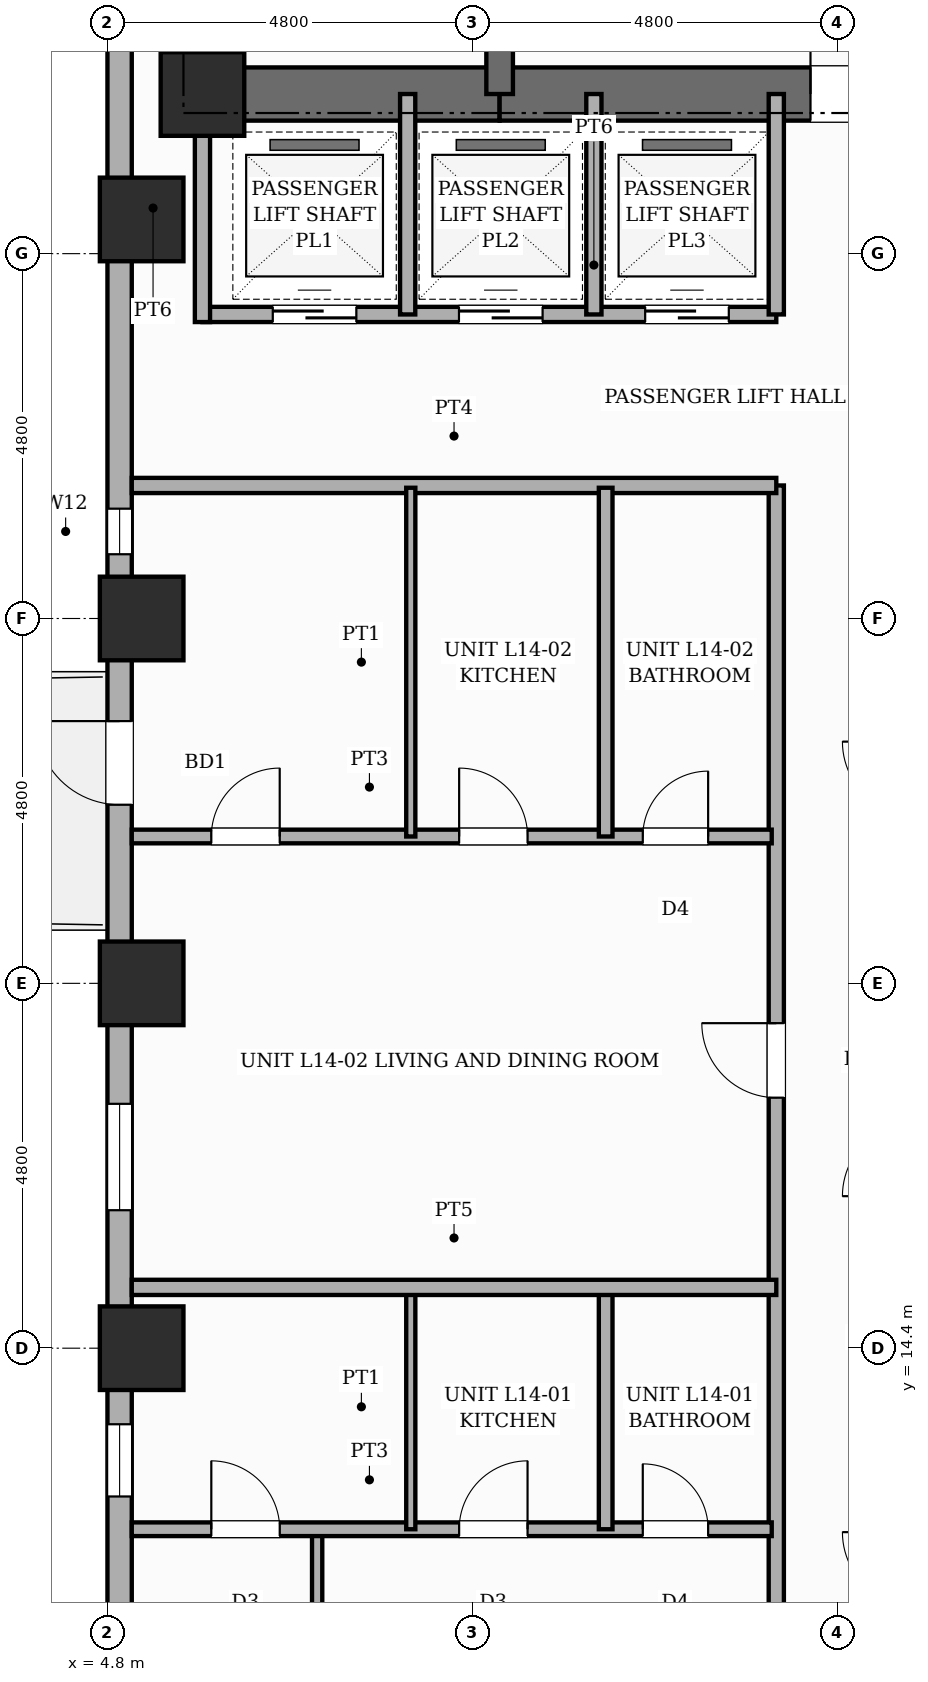
"""IFC4 building model, lengths in metres.
Left out: names, types, materials, properties, quantities, classifications, styles, units other than length and angle.
Written with IfcOpenShell. Run it as: python <this file> out.ifc"""

import sys

from ifc_helpers import new_model, si_unit, direction, frame, frame_2d, origin, origin_2d, place, context, subcontext, project, spatial, rectangle, extrude, element, fill, save


model = new_model("IFC4")
c1 = context("Model", 3, precision=1e-05, world=origin(), true_north=direction((0.0, 1.0)))
c2 = subcontext(c1, "Body", "Model", "MODEL_VIEW")
j1 = project(units=[si_unit("LENGTHUNIT", "METRE"), si_unit("PLANEANGLEUNIT", "RADIAN")], contexts=[c1])
p1 = place(None, origin())
s1 = spatial("IfcSite", under=j1, at=p1, CompositionType="ELEMENT")
p2 = place(p1, origin())
s2 = spatial("IfcBuilding", under=s1, at=p2, CompositionType="ELEMENT")
p3 = place(p2, frame((0.0, 0.0, 57.4)))
s3 = spatial("IfcBuildingStorey", under=s2, at=p3, CompositionType="ELEMENT", Elevation=57.4)
p4 = place(p3, frame((6.05, 30.55, 0.0), z_axis=(0.0, 0.0, 1.0), x_axis=(0.0, 1.0, 0.0)))
e1 = element("IfcWall", 1, at=p4, inside=s3, PredefinedType="SHEAR", context=c2, shape_type="SweptSolid", body=[
    extrude(rectangle(XDim=15.6, YDim=0.7, at=frame_2d((7.8, 0.0))), origin(), (0.0, 0.0, 1.0), 3.6),
])
p5 = place(p3, frame((6.05, 30.9, 0.0), z_axis=(0.0, 0.0, 1.0), x_axis=(1.0, 0.0, 0.0)))
e2 = element("IfcWall", 2, at=p5, inside=s3, PredefinedType="SHEAR", context=c2, shape_type="SweptSolid", body=[
    extrude(rectangle(XDim=3.91, YDim=0.7, at=frame_2d((1.955, 0.0))), origin(), (0.0, 0.0, 1.0), 3.6),
])
p6 = place(p3, frame((9.96, 30.9, 0.0), z_axis=(0.0, 0.0, 1.0), x_axis=(1.0, 0.0, 0.0)))
e3 = element("IfcWall", 3, at=p6, inside=s3, PredefinedType="SHEAR", context=c2, shape_type="SweptSolid", body=[
    extrude(rectangle(XDim=8.88, YDim=0.7, at=frame_2d((4.44, 0.0))), origin(), (0.0, 0.0, 1.0), 3.6),
])
p7 = place(p6, frame((4.09, 0.0, 0.0)))
e4 = element("IfcOpeningElement", 4, at=p7, cuts=e3, PredefinedType="OPENING", context=c2, shape_type="SweptSolid", body=[
    extrude(rectangle(XDim=1.0, YDim=2.15, at=frame_2d((0.5, 1.075))), frame((0.0, 0.36, 0.0), z_axis=(0.0, -1.0, 0.0), x_axis=(1.0, 0.0, 0.0)), (0.0, 0.0, 1.0), 0.72),
])
p8 = place(p3, frame((9.96, 30.9, 0.0), z_axis=(0.0, 0.0, 1.0), x_axis=(0.0, 1.0, 0.0)))
e5 = element("IfcWall", 5, at=p8, inside=s3, PredefinedType="SHEAR", context=c2, shape_type="SweptSolid", body=[
    extrude(rectangle(XDim=14.9, YDim=0.35, at=frame_2d((7.45, 0.0))), origin(), (0.0, 0.0, 1.0), 3.6),
])
p9 = place(p8, frame((0.65, 0.0, 0.0)))
e6 = element("IfcOpeningElement", 6, at=p9, cuts=e5, PredefinedType="OPENING", context=c2, shape_type="SweptSolid", body=[
    extrude(rectangle(XDim=0.95, YDim=2.1, at=frame_2d((0.475, 1.05))), frame((0.0, 0.185, 0.0), z_axis=(0.0, -1.0, 0.0), x_axis=(1.0, 0.0, 0.0)), (0.0, 0.0, 1.0), 0.37),
])
p10 = place(p8, frame((10.45, 0.0, 0.0)))
e7 = element("IfcOpeningElement", 7, at=p10, cuts=e5, PredefinedType="OPENING", context=c2, shape_type="SweptSolid", body=[
    extrude(rectangle(XDim=1.0, YDim=2.15, at=frame_2d((0.5, 1.075))), frame((0.0, 0.185, 0.0), z_axis=(0.0, -1.0, 0.0), x_axis=(1.0, 0.0, 0.0)), (0.0, 0.0, 1.0), 0.37),
])
for number, where, z_axis, x_axis in (
    (8, (5.25, 14.4, 0.0), (0.0, 0.0, 1.0), (1.0, 0.0, 0.0)),
    (9, (5.25, 19.2, 0.0), (0.0, 0.0, 1.0), (1.0, 0.0, 0.0)),
    (10, (5.25, 24.0, 0.0), (0.0, 0.0, 1.0), (1.0, 0.0, 0.0)),
    (11, (5.25, 29.25, 0.0), (0.0, 0.0, 1.0), (1.0, 0.0, 0.0)),
    (12, (6.05, 30.9, 0.0), (0.0, 0.0, 1.0), (1.0, 0.0, 0.0)),
):
    element("IfcColumn", number, at=place(p3, frame(where, z_axis=z_axis, x_axis=x_axis)), inside=s3, PredefinedType="COLUMN", context=c2, shape_type="SweptSolid", body=[
        extrude(rectangle(XDim=1.1, YDim=1.1, at=origin_2d()), origin(), (0.0, 0.0, 1.0), 3.6),
    ])
p11 = place(p3, frame((4.96, 7.2, 0.0), z_axis=(0.0, 0.0, 1.0), x_axis=(0.0, 1.0, 0.0)))
e13 = element("IfcWall", 13, at=p11, inside=s3, PredefinedType="STANDARD", context=c2, shape_type="SweptSolid", body=[
    extrude(rectangle(XDim=38.4, YDim=0.32, at=frame_2d((19.2, 0.0))), origin(), (0.0, 0.0, 1.0), 2.53),
])
p12 = place(p11, frame((14.35, 0.0, 0.0)))
e14 = element("IfcOpeningElement", 14, at=p12, cuts=e13, PredefinedType="OPENING", context=c2, shape_type="SweptSolid", body=[
    extrude(rectangle(XDim=1.1, YDim=2.15, at=frame_2d((0.55, 1.075))), frame((0.0, 0.17, 0.0), z_axis=(0.0, -1.0, 0.0), x_axis=(1.0, 0.0, 0.0)), (0.0, 0.0, 1.0), 0.34),
])
p13 = place(p11, frame((5.249, 0.0, 0.45)))
e15 = element("IfcOpeningElement", 15, at=p13, cuts=e13, PredefinedType="OPENING", context=c2, shape_type="SweptSolid", body=[
    extrude(rectangle(XDim=0.95, YDim=1.8, at=frame_2d((0.475, 0.9))), frame((0.0, 0.17, 0.0), z_axis=(0.0, -1.0, 0.0), x_axis=(1.0, 0.0, 0.0)), (0.0, 0.0, 1.0), 0.34),
])
p14 = place(p11, frame((17.645, 0.0, 0.45)))
e16 = element("IfcOpeningElement", 16, at=p14, cuts=e13, PredefinedType="OPENING", context=c2, shape_type="SweptSolid", body=[
    extrude(rectangle(XDim=0.6, YDim=1.8, at=frame_2d((0.3, 0.9))), frame((0.0, 0.17, 0.0), z_axis=(0.0, -1.0, 0.0), x_axis=(1.0, 0.0, 0.0)), (0.0, 0.0, 1.0), 0.34),
])
p15 = place(p11, frame((0.47, 0.0, 0.45)))
e17 = element("IfcOpeningElement", 17, at=p15, cuts=e13, PredefinedType="OPENING", context=c2, shape_type="SweptSolid", body=[
    extrude(rectangle(XDim=0.95, YDim=1.8, at=frame_2d((0.475, 0.9))), frame((0.0, 0.17, 0.0), z_axis=(0.0, -1.0, 0.0), x_axis=(1.0, 0.0, 0.0)), (0.0, 0.0, 1.0), 0.34),
])
p16 = place(p11, frame((9.015, 0.0, 0.65)))
e18 = element("IfcOpeningElement", 18, at=p16, cuts=e13, PredefinedType="OPENING", context=c2, shape_type="SweptSolid", body=[
    extrude(rectangle(XDim=1.4, YDim=1.1, at=frame_2d((0.7, 0.55))), frame((0.0, 0.17, 0.0), z_axis=(0.0, -1.0, 0.0), x_axis=(1.0, 0.0, 0.0)), (0.0, 0.0, 1.0), 0.34),
])
p17 = place(p3, frame((6.05, 28.0, 0.0), z_axis=(0.0, 0.0, 1.0), x_axis=(1.0, 0.0, 0.0)))
e19 = element("IfcWall", 19, at=p17, inside=s3, PredefinedType="POLYGONAL", context=c2, shape_type="SweptSolid", body=[
    extrude(rectangle(XDim=7.55, YDim=0.2, at=frame_2d((3.775, 0.0))), origin(), (0.0, 0.0, 1.0), 3.35),
])
p18 = place(p17, frame((0.925, 0.0, 0.0)))
e20 = element("IfcOpeningElement", 20, at=p18, cuts=e19, PredefinedType="OPENING", context=c2, shape_type="SweptSolid", body=[
    extrude(rectangle(XDim=1.1, YDim=2.15, at=frame_2d((0.55, 1.075))), frame((0.0, 0.11, 0.0), z_axis=(0.0, -1.0, 0.0), x_axis=(1.0, 0.0, 0.0)), (0.0, 0.0, 1.0), 0.22),
])
p19 = place(p17, frame((3.375, 0.0, 0.0)))
e21 = element("IfcOpeningElement", 21, at=p19, cuts=e19, PredefinedType="OPENING", context=c2, shape_type="SweptSolid", body=[
    extrude(rectangle(XDim=1.1, YDim=2.15, at=frame_2d((0.55, 1.075))), frame((0.0, 0.11, 0.0), z_axis=(0.0, -1.0, 0.0), x_axis=(1.0, 0.0, 0.0)), (0.0, 0.0, 1.0), 0.22),
])
p20 = place(p17, frame((5.825, 0.0, 0.0)))
e22 = element("IfcOpeningElement", 22, at=p20, cuts=e19, PredefinedType="OPENING", context=c2, shape_type="SweptSolid", body=[
    extrude(rectangle(XDim=1.1, YDim=2.15, at=frame_2d((0.55, 1.075))), frame((0.0, 0.11, 0.0), z_axis=(0.0, -1.0, 0.0), x_axis=(1.0, 0.0, 0.0)), (0.0, 0.0, 1.0), 0.22),
])
p21 = place(p3, frame((6.05, 27.9, 0.0), z_axis=(0.0, 0.0, 1.0), x_axis=(0.0, 1.0, 0.0)))
e23 = element("IfcWall", 23, at=p21, inside=s3, PredefinedType="POLYGONAL", context=c2, shape_type="SweptSolid", body=[
    extrude(rectangle(XDim=3.0, YDim=0.2, at=frame_2d((1.5, 0.0))), origin(), (0.0, 0.0, 1.0), 3.35),
])
for number, where, z_axis, x_axis in (
    (24, (13.6, 28.0, 0.0), (0.0, 0.0, 1.0), (0.0, 1.0, 0.0)),
    (25, (8.75, 28.0, 0.0), (0.0, 0.0, 1.0), (0.0, 1.0, 0.0)),
    (26, (11.2, 28.0, 0.0), (0.0, 0.0, 1.0), (0.0, 1.0, 0.0)),
):
    element("IfcWall", number, at=place(p3, frame(where, z_axis=z_axis, x_axis=x_axis)), inside=s3, PredefinedType="POLYGONAL", context=c2, shape_type="SweptSolid", body=[
        extrude(rectangle(XDim=2.9, YDim=0.2, at=frame_2d((1.45, 0.0))), origin(), (0.0, 0.0, 1.0), 3.35),
    ])
p22 = place(p3, frame((13.6, 5.12, 0.0), z_axis=(0.0, 0.0, 1.0), x_axis=(0.0, 1.0, 0.0)))
e27 = element("IfcWall", 27, at=p22, inside=s3, PredefinedType="PARTITIONING", context=c2, shape_type="SweptSolid", body=[
    extrude(rectangle(XDim=20.63, YDim=0.2, at=frame_2d((10.315, 0.0))), origin(), (0.0, 0.0, 1.0), 3.35),
])
p23 = place(p22, frame((2.939, 0.0, 0.0)))
e28 = element("IfcOpeningElement", 28, at=p23, cuts=e27, PredefinedType="OPENING", context=c2, shape_type="SweptSolid", body=[
    extrude(rectangle(XDim=0.98, YDim=2.18, at=frame_2d((0.49, 1.09))), frame((0.0, 0.11, 0.0), z_axis=(0.0, -1.0, 0.0), x_axis=(1.0, 0.0, 0.0)), (0.0, 0.0, 1.0), 0.22),
])
p24 = place(p22, frame((12.576, 0.0, 0.0)))
e29 = element("IfcOpeningElement", 29, at=p24, cuts=e27, PredefinedType="OPENING", context=c2, shape_type="SweptSolid", body=[
    extrude(rectangle(XDim=0.98, YDim=2.18, at=frame_2d((0.49, 1.09))), frame((0.0, 0.11, 0.0), z_axis=(0.0, -1.0, 0.0), x_axis=(1.0, 0.0, 0.0)), (0.0, 0.0, 1.0), 0.22),
])
p25 = place(p3, frame((5.12, 25.75, 0.0), z_axis=(0.0, 0.0, 1.0), x_axis=(1.0, 0.0, 0.0)))
e30 = element("IfcWall", 30, at=p25, inside=s3, PredefinedType="PARTITIONING", context=c2, shape_type="SweptSolid", body=[
    extrude(rectangle(XDim=8.48, YDim=0.2, at=frame_2d((4.24, 0.0))), origin(), (0.0, 0.0, 1.0), 3.35),
])
p26 = place(p3, frame((7.559, 5.12, 0.0), z_axis=(0.0, 0.0, 1.0), x_axis=(0.0, 1.0, 0.0)))
e31 = element("IfcWall", 31, at=p26, inside=s3, PredefinedType="PARTITIONING", context=c2, shape_type="SweptSolid", body=[
    extrude(rectangle(XDim=6.898, YDim=0.135, at=frame_2d((3.449, 0.0))), origin(), (0.0, 0.0, 1.0), 3.35),
])
p27 = place(p26, frame((2.597, 0.0, 0.0)))
e32 = element("IfcOpeningElement", 32, at=p27, cuts=e31, PredefinedType="OPENING", context=c2, shape_type="SweptSolid", body=[
    extrude(rectangle(XDim=0.9, YDim=2.15, at=frame_2d((0.45, 1.075))), frame((0.0, 0.078, 0.0), z_axis=(0.0, -1.0, 0.0), x_axis=(1.0, 0.0, 0.0)), (0.0, 0.0, 1.0), 0.155),
])
p28 = place(p3, frame((5.12, 12.018, 0.0), z_axis=(0.0, 0.0, 1.0), x_axis=(1.0, 0.0, 0.0)))
e33 = element("IfcWall", 33, at=p28, inside=s3, PredefinedType="PLUMBINGWALL", context=c2, shape_type="SweptSolid", body=[
    extrude(rectangle(XDim=8.42, YDim=0.18, at=frame_2d((4.21, 0.0))), origin(), (0.0, 0.0, 1.0), 3.35),
])
p29 = place(p28, frame((1.046, 0.0, 0.0)))
e34 = element("IfcOpeningElement", 34, at=p29, cuts=e33, PredefinedType="OPENING", context=c2, shape_type="SweptSolid", body=[
    extrude(rectangle(XDim=0.9, YDim=2.15, at=frame_2d((0.45, 1.075))), frame((0.0, 0.1, 0.0), z_axis=(0.0, -1.0, 0.0), x_axis=(1.0, 0.0, 0.0)), (0.0, 0.0, 1.0), 0.2),
])
p30 = place(p28, frame((4.307, 0.0, 0.0)))
e35 = element("IfcOpeningElement", 35, at=p30, cuts=e33, PredefinedType="OPENING", context=c2, shape_type="SweptSolid", body=[
    extrude(rectangle(XDim=0.9, YDim=2.15, at=frame_2d((0.45, 1.075))), frame((0.0, 0.1, 0.0), z_axis=(0.0, -1.0, 0.0), x_axis=(1.0, 0.0, 0.0)), (0.0, 0.0, 1.0), 0.2),
])
p31 = place(p28, frame((6.723, 0.0, 0.0)))
e36 = element("IfcOpeningElement", 36, at=p31, cuts=e33, PredefinedType="OPENING", context=c2, shape_type="SweptSolid", body=[
    extrude(rectangle(XDim=0.86, YDim=2.1, at=frame_2d((0.43, 1.05))), frame((0.0, 0.1, 0.0), z_axis=(0.0, -1.0, 0.0), x_axis=(1.0, 0.0, 0.0)), (0.0, 0.0, 1.0), 0.2),
])
p32 = place(p3, frame((8.791, 12.018, 0.0), z_axis=(0.0, 0.0, 1.0), x_axis=(0.0, 1.0, 0.0)))
e37 = element("IfcWall", 37, at=p32, inside=s3, PredefinedType="PARTITIONING", context=c2, shape_type="SweptSolid", body=[
    extrude(rectangle(XDim=3.222, YDim=0.12, at=frame_2d((1.611, 0.0))), origin(), (0.0, 0.0, 1.0), 3.35),
])
p33 = place(p3, frame((11.355, 12.018, 0.0), z_axis=(0.0, 0.0, 1.0), x_axis=(0.0, 1.0, 0.0)))
e38 = element("IfcWall", 38, at=p33, inside=s3, PredefinedType="PLUMBINGWALL", context=c2, shape_type="SweptSolid", body=[
    extrude(rectangle(XDim=3.222, YDim=0.18, at=frame_2d((1.611, 0.0))), origin(), (0.0, 0.0, 1.0), 3.35),
])
p34 = place(p3, frame((5.12, 15.2, 0.0), z_axis=(0.0, 0.0, 1.0), x_axis=(1.0, 0.0, 0.0)))
e39 = element("IfcWall", 39, at=p34, inside=s3, PredefinedType="SOLIDWALL", context=c2, shape_type="SweptSolid", body=[
    extrude(rectangle(XDim=8.48, YDim=0.2, at=frame_2d((4.24, 0.0))), origin(), (0.0, 0.0, 1.0), 3.35),
])
p35 = place(p3, frame((5.12, 21.132, 0.0), z_axis=(0.0, 0.0, 1.0), x_axis=(1.0, 0.0, 0.0)))
e40 = element("IfcWall", 40, at=p35, inside=s3, PredefinedType="PLUMBINGWALL", context=c2, shape_type="SweptSolid", body=[
    extrude(rectangle(XDim=8.42, YDim=0.18, at=frame_2d((4.21, 0.0))), origin(), (0.0, 0.0, 1.0), 3.35),
])
p36 = place(p35, frame((1.046, 0.0, 0.0)))
e41 = element("IfcOpeningElement", 41, at=p36, cuts=e40, PredefinedType="OPENING", context=c2, shape_type="SweptSolid", body=[
    extrude(rectangle(XDim=0.9, YDim=2.15, at=frame_2d((0.45, 1.075))), frame((0.0, 0.1, 0.0), z_axis=(0.0, -1.0, 0.0), x_axis=(1.0, 0.0, 0.0)), (0.0, 0.0, 1.0), 0.2),
])
p37 = place(p35, frame((4.307, 0.0, 0.0)))
e42 = element("IfcOpeningElement", 42, at=p37, cuts=e40, PredefinedType="OPENING", context=c2, shape_type="SweptSolid", body=[
    extrude(rectangle(XDim=0.9, YDim=2.15, at=frame_2d((0.45, 1.075))), frame((0.0, 0.1, 0.0), z_axis=(0.0, -1.0, 0.0), x_axis=(1.0, 0.0, 0.0)), (0.0, 0.0, 1.0), 0.2),
])
p38 = place(p35, frame((6.723, 0.0, 0.0)))
e43 = element("IfcOpeningElement", 43, at=p38, cuts=e40, PredefinedType="OPENING", context=c2, shape_type="SweptSolid", body=[
    extrude(rectangle(XDim=0.86, YDim=2.1, at=frame_2d((0.43, 1.05))), frame((0.0, 0.1, 0.0), z_axis=(0.0, -1.0, 0.0), x_axis=(1.0, 0.0, 0.0)), (0.0, 0.0, 1.0), 0.2),
])
p39 = place(p3, frame((8.791, 21.132, 0.0), z_axis=(0.0, 0.0, 1.0), x_axis=(0.0, 1.0, 0.0)))
e44 = element("IfcWall", 44, at=p39, inside=s3, PredefinedType="PARTITIONING", context=c2, shape_type="SweptSolid", body=[
    extrude(rectangle(XDim=4.588, YDim=0.12, at=frame_2d((2.294, 0.0))), origin(), (0.0, 0.0, 1.0), 3.35),
])
p40 = place(p3, frame((11.355, 21.132, 0.0), z_axis=(0.0, 0.0, 1.0), x_axis=(0.0, 1.0, 0.0)))
e45 = element("IfcWall", 45, at=p40, inside=s3, PredefinedType="PLUMBINGWALL", context=c2, shape_type="SweptSolid", body=[
    extrude(rectangle(XDim=4.588, YDim=0.18, at=frame_2d((2.294, 0.0))), origin(), (0.0, 0.0, 1.0), 3.35),
])
p41 = place(p12, origin())
e46 = element("IfcDoor", 46, at=p41, inside=s3, OperationType="SINGLE_SWING_RIGHT", PredefinedType="DOOR", context=c2, shape_type="SweptSolid", body=[
    extrude(rectangle(XDim=1.1, YDim=2.15, at=frame_2d((0.55, 1.075))), frame((0.0, 0.025, 0.0), z_axis=(0.0, -1.0, 0.0), x_axis=(1.0, 0.0, 0.0)), (0.0, 0.0, 1.0), 0.05),
])
fill(e14, e46)
p42 = place(p13, origin())
e47 = element("IfcWindow", 47, at=p42, inside=s3, PartitioningType="SINGLE_PANEL", PredefinedType="WINDOW", context=c2, shape_type="SweptSolid", body=[
    extrude(rectangle(XDim=0.95, YDim=1.8, at=frame_2d((0.475, 0.9))), frame((0.0, 0.03, 0.0), z_axis=(0.0, -1.0, 0.0), x_axis=(1.0, 0.0, 0.0)), (0.0, 0.0, 1.0), 0.06),
])
fill(e15, e47)
p43 = place(p14, origin())
e48 = element("IfcWindow", 48, at=p43, inside=s3, PartitioningType="SINGLE_PANEL", PredefinedType="WINDOW", context=c2, shape_type="SweptSolid", body=[
    extrude(rectangle(XDim=0.6, YDim=1.8, at=frame_2d((0.3, 0.9))), frame((0.0, 0.03, 0.0), z_axis=(0.0, -1.0, 0.0), x_axis=(1.0, 0.0, 0.0)), (0.0, 0.0, 1.0), 0.06),
])
fill(e16, e48)
p44 = place(p16, origin())
e49 = element("IfcWindow", 49, at=p44, inside=s3, PartitioningType="SINGLE_PANEL", PredefinedType="WINDOW", context=c2, shape_type="SweptSolid", body=[
    extrude(rectangle(XDim=1.4, YDim=1.1, at=frame_2d((0.7, 0.55))), frame((0.0, 0.03, 0.0), z_axis=(0.0, -1.0, 0.0), x_axis=(1.0, 0.0, 0.0)), (0.0, 0.0, 1.0), 0.06),
])
fill(e18, e49)
p45 = place(p7, origin())
e50 = element("IfcDoor", 50, at=p45, inside=s3, OperationType="SINGLE_SWING_LEFT", PredefinedType="DOOR", context=c2, shape_type="SweptSolid", body=[
    extrude(rectangle(XDim=1.0, YDim=2.15, at=frame_2d((0.5, 1.075))), frame((0.0, 0.025, 0.0), z_axis=(0.0, -1.0, 0.0), x_axis=(1.0, 0.0, 0.0)), (0.0, 0.0, 1.0), 0.05),
])
fill(e4, e50)
p46 = place(p18, origin())
e51 = element("IfcDoor", 51, at=p46, inside=s3, OperationType="SLIDING_TO_LEFT", PredefinedType="DOOR", context=c2, shape_type="SweptSolid", body=[
    extrude(rectangle(XDim=1.1, YDim=2.15, at=frame_2d((0.55, 1.075))), frame((0.0, 0.025, 0.0), z_axis=(0.0, -1.0, 0.0), x_axis=(1.0, 0.0, 0.0)), (0.0, 0.0, 1.0), 0.05),
])
fill(e20, e51)
p47 = place(p19, origin())
e52 = element("IfcDoor", 52, at=p47, inside=s3, OperationType="SLIDING_TO_RIGHT", PredefinedType="DOOR", context=c2, shape_type="SweptSolid", body=[
    extrude(rectangle(XDim=1.1, YDim=2.15, at=frame_2d((0.55, 1.075))), frame((0.0, 0.025, 0.0), z_axis=(0.0, -1.0, 0.0), x_axis=(1.0, 0.0, 0.0)), (0.0, 0.0, 1.0), 0.05),
])
fill(e21, e52)
p48 = place(p20, origin())
e53 = element("IfcDoor", 53, at=p48, inside=s3, OperationType="SLIDING_TO_LEFT", PredefinedType="DOOR", context=c2, shape_type="SweptSolid", body=[
    extrude(rectangle(XDim=1.1, YDim=2.15, at=frame_2d((0.55, 1.075))), frame((0.0, 0.025, 0.0), z_axis=(0.0, -1.0, 0.0), x_axis=(1.0, 0.0, 0.0)), (0.0, 0.0, 1.0), 0.05),
])
fill(e22, e53)
p49 = place(p29, origin())
e54 = element("IfcDoor", 54, at=p49, inside=s3, OperationType="SINGLE_SWING_LEFT", PredefinedType="DOOR", context=c2, shape_type="SweptSolid", body=[
    extrude(rectangle(XDim=0.9, YDim=2.15, at=frame_2d((0.45, 1.075))), frame((0.0, 0.025, 0.0), z_axis=(0.0, -1.0, 0.0), x_axis=(1.0, 0.0, 0.0)), (0.0, 0.0, 1.0), 0.05),
])
fill(e34, e54)
p50 = place(p30, origin())
e55 = element("IfcDoor", 55, at=p50, inside=s3, OperationType="SINGLE_SWING_RIGHT", PredefinedType="DOOR", context=c2, shape_type="SweptSolid", body=[
    extrude(rectangle(XDim=0.9, YDim=2.15, at=frame_2d((0.45, 1.075))), frame((0.0, 0.025, 0.0), z_axis=(0.0, -1.0, 0.0), x_axis=(1.0, 0.0, 0.0)), (0.0, 0.0, 1.0), 0.05),
])
fill(e35, e55)
p51 = place(p31, origin())
e56 = element("IfcDoor", 56, at=p51, inside=s3, OperationType="SINGLE_SWING_LEFT", PredefinedType="DOOR", context=c2, shape_type="SweptSolid", body=[
    extrude(rectangle(XDim=0.86, YDim=2.1, at=frame_2d((0.43, 1.05))), frame((0.0, 0.025, 0.0), z_axis=(0.0, -1.0, 0.0), x_axis=(1.0, 0.0, 0.0)), (0.0, 0.0, 1.0), 0.05),
])
fill(e36, e56)
p52 = place(p24, origin())
e57 = element("IfcDoor", 57, at=p52, inside=s3, OperationType="SINGLE_SWING_RIGHT", PredefinedType="DOOR", context=c2, shape_type="SweptSolid", body=[
    extrude(rectangle(XDim=0.98, YDim=2.18, at=frame_2d((0.49, 1.09))), frame((0.0, 0.025, 0.0), z_axis=(0.0, -1.0, 0.0), x_axis=(1.0, 0.0, 0.0)), (0.0, 0.0, 1.0), 0.05),
])
fill(e29, e57)
p53 = place(p36, origin())
e58 = element("IfcDoor", 58, at=p53, inside=s3, OperationType="SINGLE_SWING_RIGHT", PredefinedType="DOOR", context=c2, shape_type="SweptSolid", body=[
    extrude(rectangle(XDim=0.9, YDim=2.15, at=frame_2d((0.45, 1.075))), frame((0.0, 0.025, 0.0), z_axis=(0.0, -1.0, 0.0), x_axis=(1.0, 0.0, 0.0)), (0.0, 0.0, 1.0), 0.05),
])
fill(e41, e58)
p54 = place(p37, origin())
e59 = element("IfcDoor", 59, at=p54, inside=s3, OperationType="SINGLE_SWING_LEFT", PredefinedType="DOOR", context=c2, shape_type="SweptSolid", body=[
    extrude(rectangle(XDim=0.9, YDim=2.15, at=frame_2d((0.45, 1.075))), frame((0.0, 0.025, 0.0), z_axis=(0.0, -1.0, 0.0), x_axis=(1.0, 0.0, 0.0)), (0.0, 0.0, 1.0), 0.05),
])
fill(e42, e59)
p55 = place(p38, origin())
e60 = element("IfcDoor", 60, at=p55, inside=s3, OperationType="SINGLE_SWING_RIGHT", PredefinedType="DOOR", context=c2, shape_type="SweptSolid", body=[
    extrude(rectangle(XDim=0.86, YDim=2.1, at=frame_2d((0.43, 1.05))), frame((0.0, 0.025, 0.0), z_axis=(0.0, -1.0, 0.0), x_axis=(1.0, 0.0, 0.0)), (0.0, 0.0, 1.0), 0.05),
])
fill(e43, e60)
save(model, sys.argv[1])
